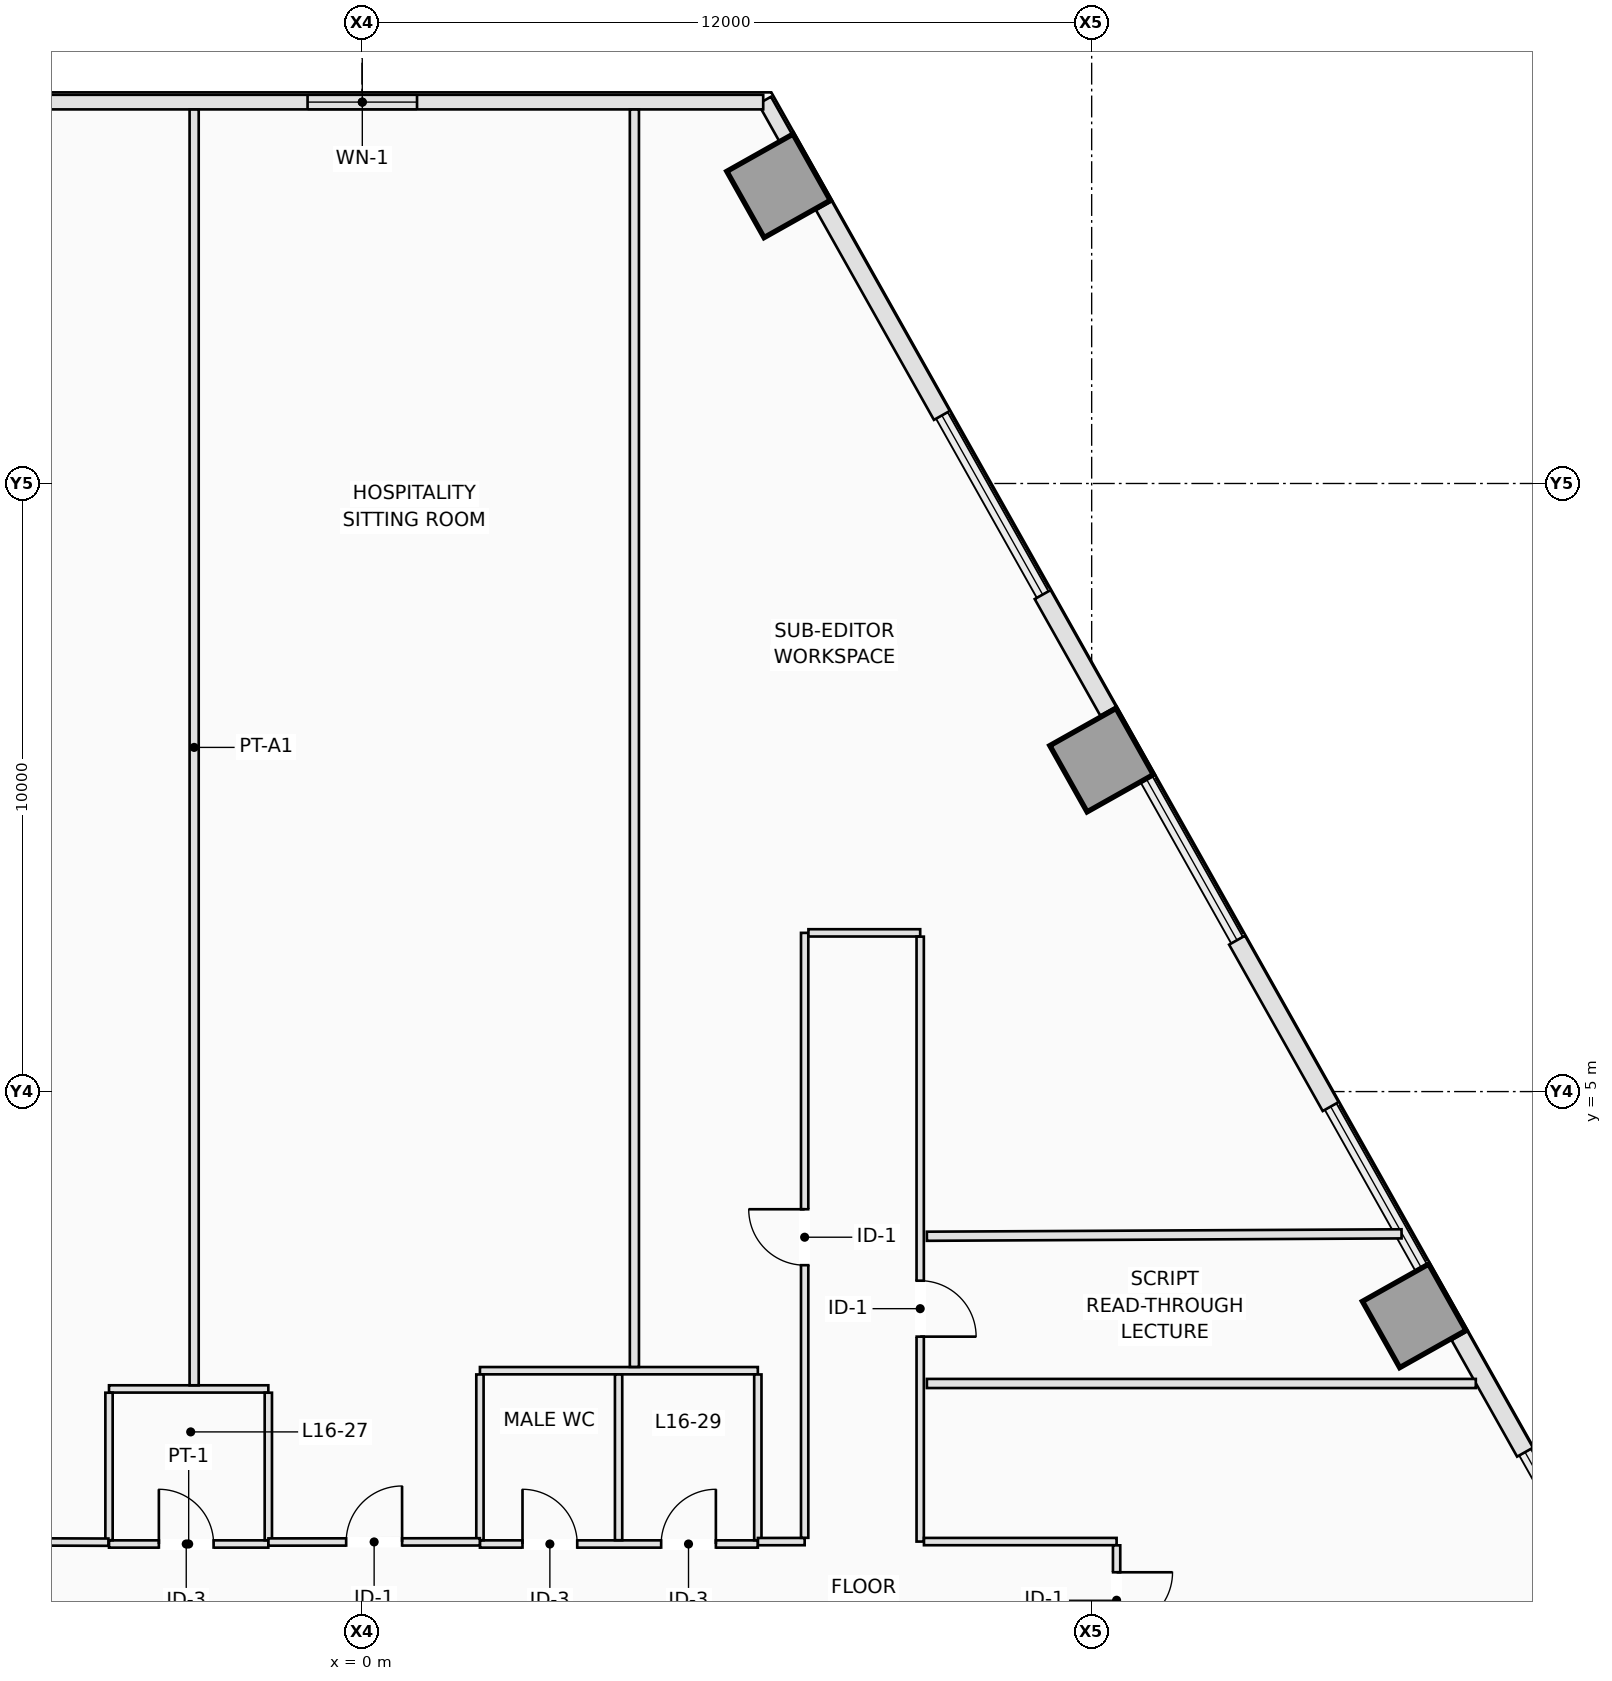
"""IFC4 building model, lengths in metres.
Left out: names, types, materials, properties, quantities, classifications, styles, units other than length and angle.
Written with IfcOpenShell. Run it as: python <this file> out.ifc"""

import sys

from ifc_helpers import new_model, si_unit, direction, frame, frame_2d, origin, origin_2d, place, context, subcontext, project, spatial, rectangle, extrude, element, fill, save


model = new_model("IFC4")
c1 = context("Model", 3, precision=1e-05, world=origin(), true_north=direction((0.0, 1.0)))
c2 = subcontext(c1, "Body", "Model", "MODEL_VIEW")
j1 = project(units=[si_unit("LENGTHUNIT", "METRE"), si_unit("PLANEANGLEUNIT", "RADIAN")], contexts=[c1])
p1 = place(None, origin())
s1 = spatial("IfcSite", under=j1, at=p1, CompositionType="ELEMENT")
p2 = place(p1, origin())
s2 = spatial("IfcBuilding", under=s1, at=p2, CompositionType="ELEMENT")
p3 = place(p2, frame((0.0, 0.0, 62.6)))
s3 = spatial("IfcBuildingStorey", under=s2, at=p3, CompositionType="ELEMENT", Elevation=62.6)
for number, where, z_axis, x_axis in (
    (1, (17.304, 1.312, 0.0), (0.0, 0.0, 1.0), (0.872, 0.49, 0.0)),
    (2, (12.163, 10.451, 0.0), (0.0, 0.0, 1.0), (0.872, 0.49, 0.0)),
    (3, (6.851, 19.895, 0.0), (0.0, 0.0, 1.0), (0.872, 0.49, 0.0)),
):
    element("IfcColumn", number, at=place(p3, frame(where, z_axis=z_axis, x_axis=x_axis)), inside=s3, PredefinedType="COLUMN", context=c2, shape_type="SweptSolid", body=[
        extrude(rectangle(XDim=1.25, YDim=1.25, at=origin_2d()), origin(), (0.0, 0.0, 1.0), 3.5),
    ])
p4 = place(p3, frame((6.622, 21.301, 0.0), z_axis=(0.0, 0.0, 1.0), x_axis=(0.490261239633, -0.871575537125, 0.0)))
e4 = element("IfcWall", 4, at=p4, inside=s3, PredefinedType="STANDARD", context=c2, shape_type="SweptSolid", body=[
    extrude(rectangle(XDim=0.708, YDim=0.24, at=frame_2d((0.354, 0.0))), origin(), (0.0, 0.0, 1.0), 3.25),
])
p5 = place(p3, frame((7.597, 19.569, 0.0), z_axis=(0.0, 0.0, 1.0), x_axis=(0.490240735008, -0.871587070659, 0.0)))
e5 = element("IfcWall", 5, at=p5, inside=s3, PredefinedType="STANDARD", context=c2, shape_type="SweptSolid", body=[
    extrude(rectangle(XDim=3.957, YDim=0.3, at=frame_2d((1.979, 0.0))), origin(), (0.0, 0.0, 1.0), 3.25),
])
p6 = place(p3, frame((11.194, 13.173, 0.0), z_axis=(0.0, 0.0, 1.0), x_axis=(0.490324540864, -0.871539927156, 0.0)))
e6 = element("IfcWall", 6, at=p6, inside=s3, PredefinedType="STANDARD", context=c2, shape_type="SweptSolid", body=[
    extrude(rectangle(XDim=2.197, YDim=0.3, at=frame_2d((1.099, 0.0))), origin(), (0.0, 0.0, 1.0), 3.25),
])
p7 = place(p3, frame((18.05, 0.986, 0.0), z_axis=(0.0, 0.0, 1.0), x_axis=(0.490277063651, -0.871566635925, 0.0)))
e7 = element("IfcWall", 7, at=p7, inside=s3, PredefinedType="STANDARD", context=c2, shape_type="SweptSolid", body=[
    extrude(rectangle(XDim=2.198, YDim=0.3, at=frame_2d((1.099, 0.0))), origin(), (0.0, 0.0, 1.0), 3.25),
])
p8 = place(p3, frame((14.391, 7.49, 0.0), z_axis=(0.0, 0.0, 1.0), x_axis=(0.490290775148, -0.871558922738, 0.0)))
e8 = element("IfcWall", 8, at=p8, inside=s3, PredefinedType="STANDARD", context=c2, shape_type="SweptSolid", body=[
    extrude(rectangle(XDim=3.14, YDim=0.3, at=frame_2d((1.57, 0.0))), origin(), (0.0, 0.0, 1.0), 3.25),
])
p9 = place(p3, frame((6.598, 21.272, 0.0), z_axis=(0.0, 0.0, 1.0), x_axis=(-1.0, 0.0, 0.0)))
e9 = element("IfcWall", 9, at=p9, inside=s3, PredefinedType="STANDARD", context=c2, shape_type="SweptSolid", body=[
    extrude(rectangle(XDim=13.187, YDim=0.24, at=frame_2d((6.593, 0.0))), origin(), (0.0, 0.0, 1.0), 3.25),
])
p10 = place(p9, frame((5.693, 0.0, 0.9)))
e10 = element("IfcOpeningElement", 10, at=p10, cuts=e9, PredefinedType="OPENING", context=c2, shape_type="SweptSolid", body=[
    extrude(rectangle(XDim=1.8, YDim=2.1, at=frame_2d((0.9, 1.05))), frame((0.0, 0.13, 0.0), z_axis=(0.0, -1.0, 0.0), x_axis=(1.0, 0.0, 0.0)), (0.0, 0.0, 1.0), 0.26),
])
p11 = place(p3, frame((-4.16, -2.44, 0.0), z_axis=(0.0, 0.0, 1.0), x_axis=(1.0, 0.0, 0.0)))
e11 = element("IfcWall", 11, at=p11, inside=s3, PredefinedType="PARTITIONING", context=c2, shape_type="SweptSolid", body=[
    extrude(rectangle(XDim=2.62, YDim=0.12, at=frame_2d((1.31, 0.0))), origin(), (0.0, 0.0, 1.0), 3.25),
])
p12 = place(p11, frame((0.82, 0.0, 0.0)))
e12 = element("IfcOpeningElement", 12, at=p12, cuts=e11, PredefinedType="OPENING", context=c2, shape_type="SweptSolid", body=[
    extrude(rectangle(XDim=0.9, YDim=2.12, at=frame_2d((0.45, 1.06))), frame((0.0, 0.07, 0.0), z_axis=(0.0, -1.0, 0.0), x_axis=(1.0, 0.0, 0.0)), (0.0, 0.0, 1.0), 0.14),
])
p13 = place(p3, frame((-4.16, 0.11, 0.0), z_axis=(0.0, 0.0, 1.0), x_axis=(1.0, 0.0, 0.0)))
e13 = element("IfcWall", 13, at=p13, inside=s3, PredefinedType="PARTITIONING", context=c2, shape_type="SweptSolid", body=[
    extrude(rectangle(XDim=2.62, YDim=0.12, at=frame_2d((1.31, 0.0))), origin(), (0.0, 0.0, 1.0), 3.25),
])
p14 = place(p3, frame((-4.16, -2.378, 0.0), z_axis=(0.0, 0.0, 1.0), x_axis=(0.0, 1.0, 0.0)))
e14 = element("IfcWall", 14, at=p14, inside=s3, PredefinedType="PARTITIONING", context=c2, shape_type="SweptSolid", body=[
    extrude(rectangle(XDim=2.426, YDim=0.12, at=frame_2d((1.213, 0.0))), origin(), (0.0, 0.0, 1.0), 2.638),
])
p15 = place(p3, frame((-1.54, -2.378, 0.0), z_axis=(0.0, 0.0, 1.0), x_axis=(0.0, 1.0, 0.0)))
e15 = element("IfcWall", 15, at=p15, inside=s3, PredefinedType="PARTITIONING", context=c2, shape_type="SweptSolid", body=[
    extrude(rectangle(XDim=2.426, YDim=0.12, at=frame_2d((1.213, 0.0))), origin(), (0.0, 0.0, 1.0), 3.25),
])
p16 = place(p3, frame((1.94, -2.44, 0.0), z_axis=(0.0, 0.0, 1.0), x_axis=(1.0, 0.0, 0.0)))
e16 = element("IfcWall", 16, at=p16, inside=s3, PredefinedType="PARTITIONING", context=c2, shape_type="SweptSolid", body=[
    extrude(rectangle(XDim=4.57, YDim=0.12, at=frame_2d((2.285, 0.0))), origin(), (0.0, 0.0, 1.0), 3.25),
])
p17 = place(p16, frame((0.7, 0.0, 0.0)))
e17 = element("IfcOpeningElement", 17, at=p17, cuts=e16, PredefinedType="OPENING", context=c2, shape_type="SweptSolid", body=[
    extrude(rectangle(XDim=0.9, YDim=2.12, at=frame_2d((0.45, 1.06))), frame((0.0, 0.07, 0.0), z_axis=(0.0, -1.0, 0.0), x_axis=(1.0, 0.0, 0.0)), (0.0, 0.0, 1.0), 0.14),
])
p18 = place(p16, frame((2.98, 0.0, 0.0)))
e18 = element("IfcOpeningElement", 18, at=p18, cuts=e16, PredefinedType="OPENING", context=c2, shape_type="SweptSolid", body=[
    extrude(rectangle(XDim=0.9, YDim=2.12, at=frame_2d((0.45, 1.06))), frame((0.0, 0.07, 0.0), z_axis=(0.0, -1.0, 0.0), x_axis=(1.0, 0.0, 0.0)), (0.0, 0.0, 1.0), 0.14),
])
p19 = place(p3, frame((1.94, 0.41, 0.0), z_axis=(0.0, 0.0, 1.0), x_axis=(1.0, 0.0, 0.0)))
e19 = element("IfcWall", 19, at=p19, inside=s3, PredefinedType="PARTITIONING", context=c2, shape_type="SweptSolid", body=[
    extrude(rectangle(XDim=4.57, YDim=0.12, at=frame_2d((2.285, 0.0))), origin(), (0.0, 0.0, 1.0), 2.844),
])
p20 = place(p3, frame((1.94, -2.378, 0.0), z_axis=(0.0, 0.0, 1.0), x_axis=(0.0, 1.0, 0.0)))
e20 = element("IfcWall", 20, at=p20, inside=s3, PredefinedType="PARTITIONING", context=c2, shape_type="SweptSolid", body=[
    extrude(rectangle(XDim=2.726, YDim=0.12, at=frame_2d((1.363, 0.0))), origin(), (0.0, 0.0, 1.0), 3.25),
])
p21 = place(p3, frame((4.22, -2.378, 0.0), z_axis=(0.0, 0.0, 1.0), x_axis=(0.0, 1.0, 0.0)))
e21 = element("IfcWall", 21, at=p21, inside=s3, PredefinedType="PARTITIONING", context=c2, shape_type="SweptSolid", body=[
    extrude(rectangle(XDim=2.726, YDim=0.12, at=frame_2d((1.363, 0.0))), origin(), (0.0, 0.0, 1.0), 2.638),
])
p22 = place(p3, frame((6.51, -2.378, 0.0), z_axis=(0.0, 0.0, 1.0), x_axis=(0.0, 1.0, 0.0)))
e22 = element("IfcWall", 22, at=p22, inside=s3, PredefinedType="PARTITIONING", context=c2, shape_type="SweptSolid", body=[
    extrude(rectangle(XDim=2.726, YDim=0.12, at=frame_2d((1.363, 0.0))), origin(), (0.0, 0.0, 1.0), 3.25),
])
p23 = place(p3, frame((-7.358, -2.4, 0.0), z_axis=(0.0, 0.0, 1.0), x_axis=(0.999995308264, -0.003063241869, 0.0)))
e23 = element("IfcWall", 23, at=p23, inside=s3, PredefinedType="PARTITIONING", context=c2, shape_type="SweptSolid", body=[
    extrude(rectangle(XDim=3.188, YDim=0.12, at=frame_2d((1.594, 0.0))), origin(), (0.0, 0.0, 1.0), 3.25),
])
p24 = place(p3, frame((-1.538, -2.408, 0.0), z_axis=(0.0, 0.0, 1.0), x_axis=(0.999999644832, 0.000842814703, 0.0)))
e24 = element("IfcWall", 24, at=p24, inside=s3, PredefinedType="PARTITIONING", context=c2, shape_type="SweptSolid", body=[
    extrude(rectangle(XDim=3.476, YDim=0.12, at=frame_2d((1.738, 0.0))), origin(), (0.0, 0.0, 1.0), 3.25),
])
p25 = place(p24, frame((1.278, 0.0, 0.0)))
e25 = element("IfcOpeningElement", 25, at=p25, cuts=e24, PredefinedType="OPENING", context=c2, shape_type="SweptSolid", body=[
    extrude(rectangle(XDim=0.92, YDim=2.12, at=frame_2d((0.46, 1.06))), frame((0.0, 0.07, 0.0), z_axis=(0.0, -1.0, 0.0), x_axis=(1.0, 0.0, 0.0)), (0.0, 0.0, 1.0), 0.14),
])
p26 = place(p3, frame((6.512, -2.401, 0.0), z_axis=(0.0, 0.0, 1.0), x_axis=(0.999999545332, 0.000953591429, 0.0)))
e26 = element("IfcWall", 26, at=p26, inside=s3, PredefinedType="PARTITIONING", context=c2, shape_type="SweptSolid", body=[
    extrude(rectangle(XDim=0.768, YDim=0.12, at=frame_2d((0.384, 0.0))), origin(), (0.0, 0.0, 1.0), 3.25),
])
p27 = place(p3, frame((7.28, -2.338, 0.0), z_axis=(0.0, 0.0, 1.0), x_axis=(0.0, 1.0, 0.0)))
e27 = element("IfcWall", 27, at=p27, inside=s3, PredefinedType="PARTITIONING", context=c2, shape_type="SweptSolid", body=[
    extrude(rectangle(XDim=9.948, YDim=0.12, at=frame_2d((4.974, 0.0))), origin(), (0.0, 0.0, 1.0), 3.25),
])
p28 = place(p27, frame((4.483, 0.0, 0.0)))
e28 = element("IfcOpeningElement", 28, at=p28, cuts=e27, PredefinedType="OPENING", context=c2, shape_type="SweptSolid", body=[
    extrude(rectangle(XDim=0.92, YDim=2.12, at=frame_2d((0.46, 1.06))), frame((0.0, 0.07, 0.0), z_axis=(0.0, -1.0, 0.0), x_axis=(1.0, 0.0, 0.0)), (0.0, 0.0, 1.0), 0.14),
])
p29 = place(p3, frame((7.342, 7.61, 0.0), z_axis=(0.0, 0.0, 1.0), x_axis=(1.0, 0.0, 0.0)))
e29 = element("IfcWall", 29, at=p29, inside=s3, PredefinedType="PARTITIONING", context=c2, shape_type="SweptSolid", body=[
    extrude(rectangle(XDim=1.838, YDim=0.12, at=frame_2d((0.919, 0.0))), origin(), (0.0, 0.0, 1.0), 3.25),
])
p30 = place(p3, frame((9.18, 7.548, 0.0), z_axis=(0.0, 0.0, 1.0), x_axis=(0.0, -1.0, 0.0)))
e30 = element("IfcWall", 30, at=p30, inside=s3, PredefinedType="PARTITIONING", context=c2, shape_type="SweptSolid", body=[
    extrude(rectangle(XDim=9.948, YDim=0.12, at=frame_2d((4.974, 0.0))), origin(), (0.0, 0.0, 1.0), 3.25),
])
p31 = place(p30, frame((5.658, 0.0, 0.0)))
e31 = element("IfcOpeningElement", 31, at=p31, cuts=e30, PredefinedType="OPENING", context=c2, shape_type="SweptSolid", body=[
    extrude(rectangle(XDim=0.92, YDim=2.12, at=frame_2d((0.46, 1.06))), frame((0.0, 0.07, 0.0), z_axis=(0.0, -1.0, 0.0), x_axis=(1.0, 0.0, 0.0)), (0.0, 0.0, 1.0), 0.14),
])
p32 = place(p3, frame((9.242, -2.4, 0.0), z_axis=(0.0, 0.0, 1.0), x_axis=(1.0, 0.0, 0.0)))
e32 = element("IfcWall", 32, at=p32, inside=s3, PredefinedType="PARTITIONING", context=c2, shape_type="SweptSolid", body=[
    extrude(rectangle(XDim=3.168, YDim=0.12, at=frame_2d((1.584, 0.0))), origin(), (0.0, 0.0, 1.0), 3.25),
])
p33 = place(p3, frame((12.41, -2.462, 0.0), z_axis=(0.0, 0.0, 1.0), x_axis=(0.0, -1.0, 0.0)))
e33 = element("IfcWall", 33, at=p33, inside=s3, PredefinedType="PARTITIONING", context=c2, shape_type="SweptSolid", body=[
    extrude(rectangle(XDim=1.636, YDim=0.12, at=frame_2d((0.818, 0.0))), origin(), (0.0, 0.0, 1.0), 3.25),
])
p34 = place(p33, frame((0.443, 0.0, 0.0)))
e34 = element("IfcOpeningElement", 34, at=p34, cuts=e33, PredefinedType="OPENING", context=c2, shape_type="SweptSolid", body=[
    extrude(rectangle(XDim=0.92, YDim=2.12, at=frame_2d((0.46, 1.06))), frame((0.0, 0.07, 0.0), z_axis=(0.0, -1.0, 0.0), x_axis=(1.0, 0.0, 0.0)), (0.0, 0.0, 1.0), 0.14),
])
p35 = place(p3, frame((-2.76, 0.17, 0.0), z_axis=(0.0, 0.0, 1.0), x_axis=(0.0, 1.0, 0.0)))
e35 = element("IfcWall", 35, at=p35, inside=s3, PredefinedType="PARTITIONING", context=c2, shape_type="SweptSolid", body=[
    extrude(rectangle(XDim=20.98, YDim=0.15, at=frame_2d((10.49, 0.0))), origin(), (0.0, 0.0, 1.0), 3.25),
])
p36 = place(p3, frame((4.48, 21.15, 0.0), z_axis=(0.0, 0.0, 1.0), x_axis=(0.0, -1.0, 0.0)))
e36 = element("IfcWall", 36, at=p36, inside=s3, PredefinedType="PARTITIONING", context=c2, shape_type="SweptSolid", body=[
    extrude(rectangle(XDim=20.678, YDim=0.15, at=frame_2d((10.339, 0.0))), origin(), (0.0, 0.0, 1.0), 2.638),
])
p37 = place(p3, frame((17.096, 2.66, 0.0), z_axis=(0.0, 0.0, 1.0), x_axis=(-0.999987164142, -0.005066710055, 0.0)))
e37 = element("IfcWall", 37, at=p37, inside=s3, PredefinedType="PARTITIONING", context=c2, shape_type="SweptSolid", body=[
    extrude(rectangle(XDim=7.806, YDim=0.15, at=frame_2d((3.903, 0.0))), origin(), (0.0, 0.0, 1.0), 3.25),
])
p38 = place(p3, frame((18.317, 0.2, 0.0), z_axis=(0.0, 0.0, 1.0), x_axis=(-1.0, 0.0, 0.0)))
e38 = element("IfcWall", 38, at=p38, inside=s3, PredefinedType="PARTITIONING", context=c2, shape_type="SweptSolid", body=[
    extrude(rectangle(XDim=9.027, YDim=0.15, at=frame_2d((4.514, 0.0))), origin(), (0.0, 0.0, 1.0), 3.25),
])
p39 = place(p10, origin())
e39 = element("IfcWindow", 39, at=p39, inside=s3, PartitioningType="SINGLE_PANEL", PredefinedType="WINDOW", context=c2, shape_type="SweptSolid", body=[
    extrude(rectangle(XDim=1.8, YDim=2.1, at=frame_2d((0.9, 1.05))), frame((0.0, 0.03, 0.0), z_axis=(0.0, -1.0, 0.0), x_axis=(1.0, 0.0, 0.0)), (0.0, 0.0, 1.0), 0.06),
])
fill(e10, e39)
p40 = place(p12, origin())
e40 = element("IfcDoor", 40, at=p40, inside=s3, OperationType="SINGLE_SWING_LEFT", PredefinedType="DOOR", context=c2, shape_type="SweptSolid", body=[
    extrude(rectangle(XDim=0.9, YDim=2.12, at=frame_2d((0.45, 1.06))), frame((0.0, 0.025, 0.0), z_axis=(0.0, -1.0, 0.0), x_axis=(1.0, 0.0, 0.0)), (0.0, 0.0, 1.0), 0.05),
])
fill(e12, e40)
p41 = place(p17, origin())
e41 = element("IfcDoor", 41, at=p41, inside=s3, OperationType="SINGLE_SWING_LEFT", PredefinedType="DOOR", context=c2, shape_type="SweptSolid", body=[
    extrude(rectangle(XDim=0.9, YDim=2.12, at=frame_2d((0.45, 1.06))), frame((0.0, 0.025, 0.0), z_axis=(0.0, -1.0, 0.0), x_axis=(1.0, 0.0, 0.0)), (0.0, 0.0, 1.0), 0.05),
])
fill(e17, e41)
p42 = place(p18, origin())
e42 = element("IfcDoor", 42, at=p42, inside=s3, OperationType="SINGLE_SWING_RIGHT", PredefinedType="DOOR", context=c2, shape_type="SweptSolid", body=[
    extrude(rectangle(XDim=0.9, YDim=2.12, at=frame_2d((0.45, 1.06))), frame((0.0, 0.025, 0.0), z_axis=(0.0, -1.0, 0.0), x_axis=(1.0, 0.0, 0.0)), (0.0, 0.0, 1.0), 0.05),
])
fill(e18, e42)
p43 = place(p25, origin())
e43 = element("IfcDoor", 43, at=p43, inside=s3, OperationType="SINGLE_SWING_RIGHT", PredefinedType="DOOR", context=c2, shape_type="SweptSolid", body=[
    extrude(rectangle(XDim=0.92, YDim=2.12, at=frame_2d((0.46, 1.06))), frame((0.0, 0.025, 0.0), z_axis=(0.0, -1.0, 0.0), x_axis=(1.0, 0.0, 0.0)), (0.0, 0.0, 1.0), 0.05),
])
fill(e25, e43)
p44 = place(p28, origin())
e44 = element("IfcDoor", 44, at=p44, inside=s3, OperationType="SINGLE_SWING_RIGHT", PredefinedType="DOOR", context=c2, shape_type="SweptSolid", body=[
    extrude(rectangle(XDim=0.92, YDim=2.12, at=frame_2d((0.46, 1.06))), frame((0.0, 0.025, 0.0), z_axis=(0.0, -1.0, 0.0), x_axis=(1.0, 0.0, 0.0)), (0.0, 0.0, 1.0), 0.05),
])
fill(e28, e44)
p45 = place(p31, origin())
e45 = element("IfcDoor", 45, at=p45, inside=s3, OperationType="SINGLE_SWING_RIGHT", PredefinedType="DOOR", context=c2, shape_type="SweptSolid", body=[
    extrude(rectangle(XDim=0.92, YDim=2.12, at=frame_2d((0.46, 1.06))), frame((0.0, 0.025, 0.0), z_axis=(0.0, -1.0, 0.0), x_axis=(1.0, 0.0, 0.0)), (0.0, 0.0, 1.0), 0.05),
])
fill(e31, e45)
p46 = place(p34, origin())
e46 = element("IfcDoor", 46, at=p46, inside=s3, OperationType="SINGLE_SWING_LEFT", PredefinedType="DOOR", context=c2, shape_type="SweptSolid", body=[
    extrude(rectangle(XDim=0.92, YDim=2.12, at=frame_2d((0.46, 1.06))), frame((0.0, 0.025, 0.0), z_axis=(0.0, -1.0, 0.0), x_axis=(1.0, 0.0, 0.0)), (0.0, 0.0, 1.0), 0.05),
])
fill(e34, e46)
save(model, sys.argv[1])
